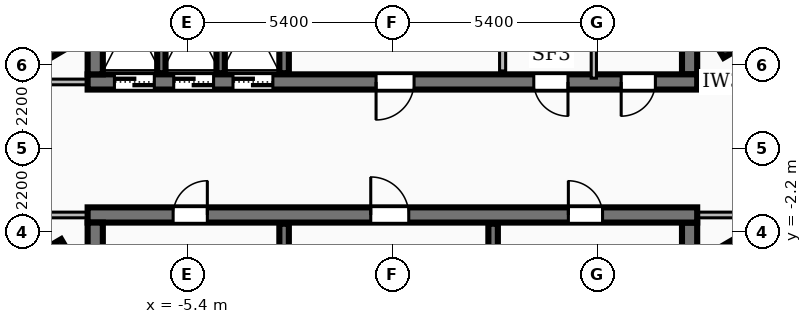
"""IFC4 building model, lengths in metres.
Left out: names, types, materials, properties, quantities, classifications, styles, units other than length and angle.
Written with IfcOpenShell. Run it as: python <this file> out.ifc"""

import sys

from ifc_helpers import new_model, si_unit, direction, frame, frame_2d, origin, origin_2d, place, context, subcontext, project, spatial, rectangle, extrude, element, fill, save


model = new_model("IFC4")
c1 = context("Model", 3, precision=1e-05, world=origin(), true_north=direction((0.0, 1.0)))
c2 = subcontext(c1, "Body", "Model", "MODEL_VIEW")
j1 = project(units=[si_unit("LENGTHUNIT", "METRE"), si_unit("PLANEANGLEUNIT", "RADIAN")], contexts=[c1])
p1 = place(None, origin())
s1 = spatial("IfcSite", under=j1, at=p1, CompositionType="ELEMENT")
p2 = place(p1, origin())
s2 = spatial("IfcBuilding", under=s1, at=p2, CompositionType="ELEMENT")
p3 = place(p2, frame((0.0, 0.0, 208.62)))
s3 = spatial("IfcBuildingStorey", under=s2, at=p3, CompositionType="ELEMENT", Elevation=208.62)
p4 = place(p3, frame((8.02, 1.75, 0.0), z_axis=(0.0, 0.0, 1.0), x_axis=(-1.0, 0.0, 0.0)))
e1 = element("IfcWall", 1, at=p4, inside=s3, PredefinedType="SHEAR", context=c2, shape_type="SweptSolid", body=[
    extrude(rectangle(XDim=16.04, YDim=0.4, at=frame_2d((8.02, 0.0))), origin(), (0.0, 0.0, 1.0), 3.16),
])
p5 = place(p4, frame((7.45, 0.0, 0.0)))
e2 = element("IfcOpeningElement", 2, at=p5, cuts=e1, PredefinedType="OPENING", context=c2, shape_type="SweptSolid", body=[
    extrude(rectangle(XDim=1.0, YDim=2.1, at=frame_2d((0.5, 1.05))), frame((0.0, 0.21, 0.0), z_axis=(0.0, -1.0, 0.0), x_axis=(1.0, 0.0, 0.0)), (0.0, 0.0, 1.0), 0.42),
])
p6 = place(p4, frame((14.285, 0.0, 0.0)))
e3 = element("IfcOpeningElement", 3, at=p6, cuts=e1, PredefinedType="OPENING", context=c2, shape_type="SweptSolid", body=[
    extrude(rectangle(XDim=1.05, YDim=2.15, at=frame_2d((0.525, 1.075))), frame((0.0, 0.21, 0.0), z_axis=(0.0, -1.0, 0.0), x_axis=(1.0, 0.0, 0.0)), (0.0, 0.0, 1.0), 0.42),
])
p7 = place(p4, frame((12.725, 0.0, 0.0)))
e4 = element("IfcOpeningElement", 4, at=p7, cuts=e1, PredefinedType="OPENING", context=c2, shape_type="SweptSolid", body=[
    extrude(rectangle(XDim=1.05, YDim=2.15, at=frame_2d((0.525, 1.075))), frame((0.0, 0.21, 0.0), z_axis=(0.0, -1.0, 0.0), x_axis=(1.0, 0.0, 0.0)), (0.0, 0.0, 1.0), 0.42),
])
p8 = place(p4, frame((11.165, 0.0, 0.0)))
e5 = element("IfcOpeningElement", 5, at=p8, cuts=e1, PredefinedType="OPENING", context=c2, shape_type="SweptSolid", body=[
    extrude(rectangle(XDim=1.05, YDim=2.15, at=frame_2d((0.525, 1.075))), frame((0.0, 0.21, 0.0), z_axis=(0.0, -1.0, 0.0), x_axis=(1.0, 0.0, 0.0)), (0.0, 0.0, 1.0), 0.42),
])
p9 = place(p4, frame((3.4, 0.0, 0.0)))
e6 = element("IfcOpeningElement", 6, at=p9, cuts=e1, PredefinedType="OPENING", context=c2, shape_type="SweptSolid", body=[
    extrude(rectangle(XDim=0.9, YDim=2.06, at=frame_2d((0.45, 1.03))), frame((0.0, 0.21, 0.0), z_axis=(0.0, -1.0, 0.0), x_axis=(1.0, 0.0, 0.0)), (0.0, 0.0, 1.0), 0.42),
])
p10 = place(p4, frame((1.1, 0.0, 0.0)))
e7 = element("IfcOpeningElement", 7, at=p10, cuts=e1, PredefinedType="OPENING", context=c2, shape_type="SweptSolid", body=[
    extrude(rectangle(XDim=0.9, YDim=2.06, at=frame_2d((0.45, 1.03))), frame((0.0, 0.21, 0.0), z_axis=(0.0, -1.0, 0.0), x_axis=(1.0, 0.0, 0.0)), (0.0, 0.0, 1.0), 0.42),
])
for number, where, z_axis, x_axis in (
    (8, (-7.82, 1.95, 0.0), (0.0, 0.0, 1.0), (0.0, 1.0, 0.0)),
    (9, (7.82, 8.31, 0.0), (0.0, 0.0, 1.0), (0.0, -1.0, 0.0)),
):
    element("IfcWall", number, at=place(p3, frame(where, z_axis=z_axis, x_axis=x_axis)), inside=s3, PredefinedType="SHEAR", context=c2, shape_type="SweptSolid", body=[
        extrude(rectangle(XDim=6.36, YDim=0.4, at=frame_2d((3.18, 0.0))), origin(), (0.0, 0.0, 1.0), 3.16),
    ])
p11 = place(p3, frame((-8.02, -1.75, 0.0), z_axis=(0.0, 0.0, 1.0), x_axis=(1.0, 0.0, 0.0)))
e10 = element("IfcWall", 10, at=p11, inside=s3, PredefinedType="SHEAR", context=c2, shape_type="SweptSolid", body=[
    extrude(rectangle(XDim=16.04, YDim=0.4, at=frame_2d((8.02, 0.0))), origin(), (0.0, 0.0, 1.0), 3.16),
])
p12 = place(p11, frame((7.45, 0.0, 0.0)))
e11 = element("IfcOpeningElement", 11, at=p12, cuts=e10, PredefinedType="OPENING", context=c2, shape_type="SweptSolid", body=[
    extrude(rectangle(XDim=1.0, YDim=2.1, at=frame_2d((0.5, 1.05))), frame((0.0, 0.21, 0.0), z_axis=(0.0, -1.0, 0.0), x_axis=(1.0, 0.0, 0.0)), (0.0, 0.0, 1.0), 0.42),
])
p13 = place(p11, frame((12.65, 0.0, 0.0)))
e12 = element("IfcOpeningElement", 12, at=p13, cuts=e10, PredefinedType="OPENING", context=c2, shape_type="SweptSolid", body=[
    extrude(rectangle(XDim=0.9, YDim=2.06, at=frame_2d((0.45, 1.03))), frame((0.0, 0.21, 0.0), z_axis=(0.0, -1.0, 0.0), x_axis=(1.0, 0.0, 0.0)), (0.0, 0.0, 1.0), 0.42),
])
p14 = place(p11, frame((2.25, 0.0, 0.0)))
e13 = element("IfcOpeningElement", 13, at=p14, cuts=e10, PredefinedType="OPENING", context=c2, shape_type="SweptSolid", body=[
    extrude(rectangle(XDim=0.9, YDim=2.06, at=frame_2d((0.45, 1.03))), frame((0.0, 0.21, 0.0), z_axis=(0.0, -1.0, 0.0), x_axis=(1.0, 0.0, 0.0)), (0.0, 0.0, 1.0), 0.42),
])
for number, where, z_axis, x_axis in (
    (14, (-7.82, -8.31, 0.0), (0.0, 0.0, 1.0), (0.0, 1.0, 0.0)),
    (15, (7.82, -1.95, 0.0), (0.0, 0.0, 1.0), (0.0, -1.0, 0.0)),
):
    element("IfcWall", number, at=place(p3, frame(where, z_axis=z_axis, x_axis=x_axis)), inside=s3, PredefinedType="SHEAR", context=c2, shape_type="SweptSolid", body=[
        extrude(rectangle(XDim=6.36, YDim=0.4, at=frame_2d((3.18, 0.0))), origin(), (0.0, 0.0, 1.0), 3.16),
    ])
for number, where, z_axis, x_axis in (
    (16, (-2.85, 1.98, 0.0), (0.0, 0.0, 1.0), (0.0, 1.0, 0.0)),
    (17, (-2.85, -5.05, 0.0), (0.0, 0.0, 1.0), (0.0, 1.0, 0.0)),
    (18, (2.65, -5.05, 0.0), (0.0, 0.0, 1.0), (0.0, 1.0, 0.0)),
):
    element("IfcWall", number, at=place(p3, frame(where, z_axis=z_axis, x_axis=x_axis)), inside=s3, PredefinedType="SOLIDWALL", context=c2, shape_type="SweptSolid", body=[
        extrude(rectangle(XDim=3.07, YDim=0.25, at=frame_2d((1.535, 0.0))), origin(), (0.0, 0.0, 1.0), 3.16),
    ])
for number, where, z_axis, x_axis in (
    (19, (-6.08, 1.98, 0.0), (0.0, 0.0, 1.0), (0.0, 1.0, 0.0)),
    (20, (-4.52, 1.98, 0.0), (0.0, 0.0, 1.0), (0.0, 1.0, 0.0)),
):
    element("IfcWall", number, at=place(p3, frame(where, z_axis=z_axis, x_axis=x_axis)), inside=s3, PredefinedType="SOLIDWALL", context=c2, shape_type="SweptSolid", body=[
        extrude(rectangle(XDim=3.07, YDim=0.22, at=frame_2d((1.535, 0.0))), origin(), (0.0, 0.0, 1.0), 3.16),
    ])
for number, where, z_axis, x_axis in (
    (21, (-8.85, -2.9, 0.0), (0.0, 0.0, 1.0), (0.863, 0.506, 0.0)),
    (22, (-8.85, 2.9, 0.0), (0.0, 0.0, 1.0), (0.863, 0.506, 0.0)),
    (23, (8.85, -2.9, 0.0), (0.0, 0.0, 1.0), (0.863, 0.506, 0.0)),
    (24, (8.85, 2.9, 0.0), (0.0, 0.0, 1.0), (0.863, 0.506, 0.0)),
):
    element("IfcColumn", number, at=place(p3, frame(where, z_axis=z_axis, x_axis=x_axis)), inside=s3, PredefinedType="COLUMN", context=c2, shape_type="SweptSolid", body=[
        extrude(rectangle(XDim=0.75, YDim=0.75, at=origin_2d()), origin(), (0.0, 0.0, 1.0), 3.42),
    ])
p15 = place(p3, frame((2.9, 2.04, 0.0), z_axis=(0.0, 0.0, 1.0), x_axis=(0.0, 1.0, 0.0)))
e25 = element("IfcWall", 25, at=p15, inside=s3, PredefinedType="PARTITIONING", context=c2, shape_type="SweptSolid", body=[
    extrude(rectangle(XDim=2.94, YDim=0.16, at=frame_2d((1.47, 0.0))), origin(), (0.0, 0.0, 1.0), 2.39),
])
p16 = place(p15, frame((1.82, 0.0, 0.0)))
e26 = element("IfcOpeningElement", 26, at=p16, cuts=e25, PredefinedType="OPENING", context=c2, shape_type="SweptSolid", body=[
    extrude(rectangle(XDim=0.9, YDim=2.06, at=frame_2d((0.45, 1.03))), frame((0.0, 0.09, 0.0), z_axis=(0.0, -1.0, 0.0), x_axis=(1.0, 0.0, 0.0)), (0.0, 0.0, 1.0), 0.18),
])
p17 = place(p3, frame((5.3, 1.85, 0.0), z_axis=(0.0, 0.0, 1.0), x_axis=(0.0, 1.0, 0.0)))
e27 = element("IfcWall", 27, at=p17, inside=s3, PredefinedType="PARTITIONING", context=c2, shape_type="SweptSolid", body=[
    extrude(rectangle(XDim=1.89, YDim=0.138, at=frame_2d((0.945, 0.0))), origin(), (0.0, 0.0, 1.0), 2.39),
])
for number, where, z_axis, x_axis in (
    (28, (-7.85, 1.75, 0.0), (0.0, 0.0, 1.0), (-1.0, 0.0, 0.0)),
    (29, (-7.85, -1.75, 0.0), (0.0, 0.0, 1.0), (-1.0, 0.0, 0.0)),
    (30, (7.85, 1.75, 0.0), (0.0, 0.0, 1.0), (1.0, 0.0, 0.0)),
    (31, (7.85, -1.75, 0.0), (0.0, 0.0, 1.0), (1.0, 0.0, 0.0)),
):
    element("IfcWall", number, at=place(p3, frame(where, z_axis=z_axis, x_axis=x_axis)), inside=s3, PredefinedType="PARTITIONING", context=c2, shape_type="SweptSolid", body=[
        extrude(rectangle(XDim=1.67, YDim=0.15, at=frame_2d((0.835, 0.0))), origin(), (0.0, 0.0, 1.0), 2.39),
    ])
p18 = place(p5, origin())
e32 = element("IfcDoor", 32, at=p18, inside=s3, OperationType="SINGLE_SWING_RIGHT", PredefinedType="DOOR", context=c2, shape_type="SweptSolid", body=[
    extrude(rectangle(XDim=1.0, YDim=2.1, at=frame_2d((0.5, 1.05))), frame((0.0, 0.025, 0.0), z_axis=(0.0, -1.0, 0.0), x_axis=(1.0, 0.0, 0.0)), (0.0, 0.0, 1.0), 0.05),
])
fill(e2, e32)
p19 = place(p12, origin())
e33 = element("IfcDoor", 33, at=p19, inside=s3, OperationType="SINGLE_SWING_LEFT", PredefinedType="DOOR", context=c2, shape_type="SweptSolid", body=[
    extrude(rectangle(XDim=1.0, YDim=2.1, at=frame_2d((0.5, 1.05))), frame((0.0, 0.025, 0.0), z_axis=(0.0, -1.0, 0.0), x_axis=(1.0, 0.0, 0.0)), (0.0, 0.0, 1.0), 0.05),
])
fill(e11, e33)
p20 = place(p6, origin())
e34 = element("IfcDoor", 34, at=p20, inside=s3, OperationType="DOUBLE_DOOR_SLIDING", PredefinedType="DOOR", context=c2, shape_type="SweptSolid", body=[
    extrude(rectangle(XDim=1.05, YDim=2.15, at=frame_2d((0.525, 1.075))), frame((0.0, 0.025, 0.0), z_axis=(0.0, -1.0, 0.0), x_axis=(1.0, 0.0, 0.0)), (0.0, 0.0, 1.0), 0.05),
])
fill(e3, e34)
p21 = place(p7, origin())
e35 = element("IfcDoor", 35, at=p21, inside=s3, OperationType="DOUBLE_DOOR_SLIDING", PredefinedType="DOOR", context=c2, shape_type="SweptSolid", body=[
    extrude(rectangle(XDim=1.05, YDim=2.15, at=frame_2d((0.525, 1.075))), frame((0.0, 0.025, 0.0), z_axis=(0.0, -1.0, 0.0), x_axis=(1.0, 0.0, 0.0)), (0.0, 0.0, 1.0), 0.05),
])
fill(e4, e35)
p22 = place(p8, origin())
e36 = element("IfcDoor", 36, at=p22, inside=s3, OperationType="DOUBLE_DOOR_SLIDING", PredefinedType="DOOR", context=c2, shape_type="SweptSolid", body=[
    extrude(rectangle(XDim=1.05, YDim=2.15, at=frame_2d((0.525, 1.075))), frame((0.0, 0.025, 0.0), z_axis=(0.0, -1.0, 0.0), x_axis=(1.0, 0.0, 0.0)), (0.0, 0.0, 1.0), 0.05),
])
fill(e5, e36)
p23 = place(p13, origin())
e37 = element("IfcDoor", 37, at=p23, inside=s3, OperationType="SINGLE_SWING_LEFT", PredefinedType="DOOR", context=c2, shape_type="SweptSolid", body=[
    extrude(rectangle(XDim=0.9, YDim=2.06, at=frame_2d((0.45, 1.03))), frame((0.0, 0.025, 0.0), z_axis=(0.0, -1.0, 0.0), x_axis=(1.0, 0.0, 0.0)), (0.0, 0.0, 1.0), 0.05),
])
fill(e12, e37)
p24 = place(p14, origin())
e38 = element("IfcDoor", 38, at=p24, inside=s3, OperationType="SINGLE_SWING_RIGHT", PredefinedType="DOOR", context=c2, shape_type="SweptSolid", body=[
    extrude(rectangle(XDim=0.9, YDim=2.06, at=frame_2d((0.45, 1.03))), frame((0.0, 0.025, 0.0), z_axis=(0.0, -1.0, 0.0), x_axis=(1.0, 0.0, 0.0)), (0.0, 0.0, 1.0), 0.05),
])
fill(e13, e38)
p25 = place(p9, origin())
e39 = element("IfcDoor", 39, at=p25, inside=s3, OperationType="SINGLE_SWING_LEFT", PredefinedType="DOOR", context=c2, shape_type="SweptSolid", body=[
    extrude(rectangle(XDim=0.9, YDim=2.06, at=frame_2d((0.45, 1.03))), frame((0.0, 0.025, 0.0), z_axis=(0.0, -1.0, 0.0), x_axis=(1.0, 0.0, 0.0)), (0.0, 0.0, 1.0), 0.05),
])
fill(e6, e39)
p26 = place(p10, origin())
e40 = element("IfcDoor", 40, at=p26, inside=s3, OperationType="SINGLE_SWING_RIGHT", PredefinedType="DOOR", context=c2, shape_type="SweptSolid", body=[
    extrude(rectangle(XDim=0.9, YDim=2.06, at=frame_2d((0.45, 1.03))), frame((0.0, 0.025, 0.0), z_axis=(0.0, -1.0, 0.0), x_axis=(1.0, 0.0, 0.0)), (0.0, 0.0, 1.0), 0.05),
])
fill(e7, e40)
save(model, sys.argv[1])
